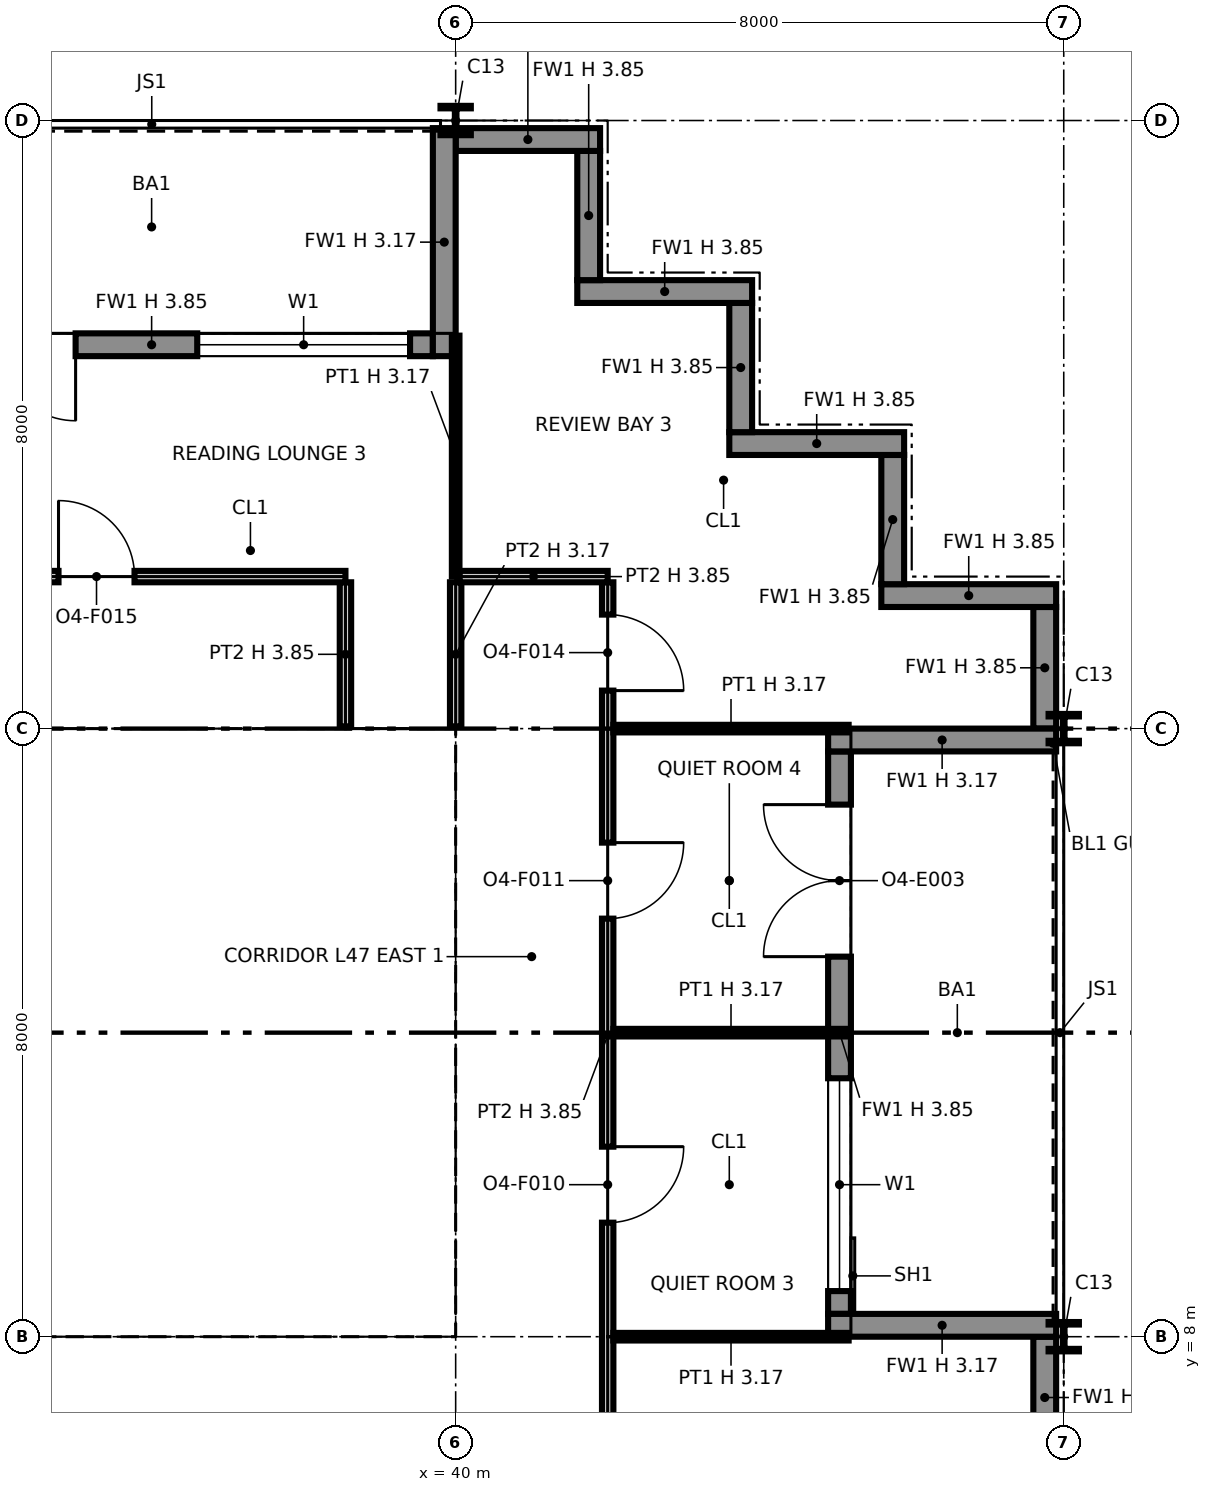
"""IFC4 building model, lengths in metres.
Left out: names, types, materials, properties, quantities, classifications, styles, units other than length and angle.
Written with IfcOpenShell. Run it as: python <this file> out.ifc"""

import sys

from ifc_helpers import new_model, si_unit, direction, frame, frame_2d, origin, origin_2d, place, context, subcontext, project, spatial, polyline, rectangle, i_section, outline, extrude, element, fill, save


model = new_model("IFC4")
c1 = context("Model", 3, precision=1e-05, world=origin(), true_north=direction((0.0, 1.0)))
c2 = subcontext(c1, "Body", "Model", "MODEL_VIEW")
j1 = project(units=[si_unit("LENGTHUNIT", "METRE"), si_unit("PLANEANGLEUNIT", "RADIAN")], contexts=[c1])
p1 = place(None, origin())
s1 = spatial("IfcSite", under=j1, at=p1, CompositionType="ELEMENT")
p2 = place(p1, origin())
s2 = spatial("IfcBuilding", under=s1, at=p2, CompositionType="ELEMENT")
p3 = place(p2, frame((0.0, 0.0, 221.0)))
s3 = spatial("IfcBuildingStorey", under=s2, at=p3, CompositionType="ELEMENT", Elevation=221.0)
for number, where, z_axis, x_axis in (
    (1, (40.0, 8.0, 0.0), (0.0, 0.0, 1.0), (1.0, 0.0, 0.0)),
    (2, (40.0, 16.0, 0.0), (0.0, 0.0, 1.0), (1.0, 0.0, 0.0)),
):
    element("IfcColumn", number, at=place(p3, frame(where, z_axis=z_axis, x_axis=x_axis)), inside=s3, PredefinedType="COLUMN", context=c2, shape_type="SweptSolid", body=[
        extrude(i_section(OverallWidth=0.373, OverallDepth=0.368, WebThickness=0.015, FlangeThickness=0.024, at=origin_2d()), origin(), (0.0, 0.0, 1.0), 3.85),
    ])
for number, where, z_axis, x_axis in (
    (3, (40.0, 24.0, 0.0), (0.0, 0.0, 1.0), (1.0, 0.0, 0.0)),
    (4, (48.0, 8.0, 0.0), (0.0, 0.0, 1.0), (1.0, 0.0, 0.0)),
    (5, (48.0, 16.0, 0.0), (0.0, 0.0, 1.0), (1.0, 0.0, 0.0)),
):
    element("IfcColumn", number, at=place(p3, frame(where, z_axis=z_axis, x_axis=x_axis)), inside=s3, PredefinedType="COLUMN", context=c2, shape_type="SweptSolid", body=[
        extrude(i_section(OverallWidth=0.399, OverallDepth=0.386, WebThickness=0.021, FlangeThickness=0.033, at=origin_2d()), origin(), (0.0, 0.0, 1.0), 3.85),
    ])
p4 = place(p3, frame((47.75, 6.4, 0.0), z_axis=(0.0, 0.0, 1.0), x_axis=(0.0, 1.0, 0.0)))
e6 = element("IfcWall", 6, at=p4, inside=s3, PredefinedType="SOLIDWALL", context=c2, shape_type="SweptSolid", body=[
    extrude(rectangle(XDim=1.6, YDim=0.3, at=frame_2d((0.8, 0.0))), origin(), (0.0, 0.0, 1.0), 3.85),
])
p5 = place(p3, frame((45.05, 8.3, 0.0), z_axis=(0.0, 0.0, 1.0), x_axis=(0.0, 1.0, 0.0)))
e7 = element("IfcWall", 7, at=p5, inside=s3, PredefinedType="SOLIDWALL", context=c2, shape_type="SweptSolid", body=[
    extrude(rectangle(XDim=7.4, YDim=0.3, at=frame_2d((3.7, 0.0))), origin(), (0.0, 0.0, 1.0), 3.85),
])
p6 = place(p5, frame((0.3, 0.0, 0.9)))
e8 = element("IfcOpeningElement", 8, at=p6, cuts=e7, PredefinedType="OPENING", context=c2, shape_type="SweptSolid", body=[
    extrude(rectangle(XDim=2.8, YDim=2.2, at=frame_2d((1.4, 1.1))), frame((0.0, 0.16, 0.0), z_axis=(0.0, -1.0, 0.0), x_axis=(1.0, 0.0, 0.0)), (0.0, 0.0, 1.0), 0.32),
])
p7 = place(p5, frame((4.7, 0.0, 0.0)))
e9 = element("IfcOpeningElement", 9, at=p7, cuts=e7, PredefinedType="OPENING", context=c2, shape_type="SweptSolid", body=[
    extrude(rectangle(XDim=2.0, YDim=2.4, at=frame_2d((1.0, 1.2))), frame((0.0, 0.16, 0.0), z_axis=(0.0, -1.0, 0.0), x_axis=(1.0, 0.0, 0.0)), (0.0, 0.0, 1.0), 0.32),
])
for number, where, z_axis, x_axis in (
    (10, (47.9, 8.15, 0.0), (0.0, 0.0, 1.0), (-1.0, 0.0, 0.0)),
    (11, (47.9, 15.85, 0.0), (0.0, 0.0, 1.0), (-1.0, 0.0, 0.0)),
):
    element("IfcWall", number, at=place(p3, frame(where, z_axis=z_axis, x_axis=x_axis)), inside=s3, PredefinedType="SOLIDWALL", context=c2, shape_type="SweptSolid", body=[
        extrude(rectangle(XDim=3.0, YDim=0.3, at=frame_2d((1.5, 0.0))), origin(), (0.0, 0.0, 1.0), 3.171),
    ])
p8 = place(p3, frame((47.75, 16.0, 0.0), z_axis=(0.0, 0.0, 1.0), x_axis=(0.0, 1.0, 0.0)))
e12 = element("IfcWall", 12, at=p8, inside=s3, PredefinedType="SOLIDWALL", context=c2, shape_type="SweptSolid", body=[
    extrude(rectangle(XDim=1.6, YDim=0.3, at=frame_2d((0.8, 0.0))), origin(), (0.0, 0.0, 1.0), 3.85),
])
p9 = place(p3, frame((47.9, 17.75, 0.0), z_axis=(0.0, 0.0, 1.0), x_axis=(-1.0, 0.0, 0.0)))
e13 = element("IfcWall", 13, at=p9, inside=s3, PredefinedType="SOLIDWALL", context=c2, shape_type="SweptSolid", body=[
    extrude(rectangle(XDim=2.3, YDim=0.3, at=frame_2d((1.15, 0.0))), origin(), (0.0, 0.0, 1.0), 3.85),
])
p10 = place(p3, frame((45.75, 17.9, 0.0), z_axis=(0.0, 0.0, 1.0), x_axis=(0.0, 1.0, 0.0)))
e14 = element("IfcWall", 14, at=p10, inside=s3, PredefinedType="SOLIDWALL", context=c2, shape_type="SweptSolid", body=[
    extrude(rectangle(XDim=1.7, YDim=0.3, at=frame_2d((0.85, 0.0))), origin(), (0.0, 0.0, 1.0), 3.85),
])
p11 = place(p3, frame((45.9, 19.75, 0.0), z_axis=(0.0, 0.0, 1.0), x_axis=(-1.0, 0.0, 0.0)))
e15 = element("IfcWall", 15, at=p11, inside=s3, PredefinedType="SOLIDWALL", context=c2, shape_type="SweptSolid", body=[
    extrude(rectangle(XDim=2.3, YDim=0.3, at=frame_2d((1.15, 0.0))), origin(), (0.0, 0.0, 1.0), 3.85),
])
p12 = place(p3, frame((43.75, 19.9, 0.0), z_axis=(0.0, 0.0, 1.0), x_axis=(0.0, 1.0, 0.0)))
e16 = element("IfcWall", 16, at=p12, inside=s3, PredefinedType="SOLIDWALL", context=c2, shape_type="SweptSolid", body=[
    extrude(rectangle(XDim=1.7, YDim=0.3, at=frame_2d((0.85, 0.0))), origin(), (0.0, 0.0, 1.0), 3.85),
])
p13 = place(p3, frame((43.9, 21.75, 0.0), z_axis=(0.0, 0.0, 1.0), x_axis=(-1.0, 0.0, 0.0)))
e17 = element("IfcWall", 17, at=p13, inside=s3, PredefinedType="SOLIDWALL", context=c2, shape_type="SweptSolid", body=[
    extrude(rectangle(XDim=2.3, YDim=0.3, at=frame_2d((1.15, 0.0))), origin(), (0.0, 0.0, 1.0), 3.85),
])
p14 = place(p3, frame((41.75, 21.9, 0.0), z_axis=(0.0, 0.0, 1.0), x_axis=(0.0, 1.0, 0.0)))
e18 = element("IfcWall", 18, at=p14, inside=s3, PredefinedType="SOLIDWALL", context=c2, shape_type="SweptSolid", body=[
    extrude(rectangle(XDim=1.7, YDim=0.3, at=frame_2d((0.85, 0.0))), origin(), (0.0, 0.0, 1.0), 3.85),
])
p15 = place(p3, frame((41.9, 23.75, 0.0), z_axis=(0.0, 0.0, 1.0), x_axis=(-1.0, 0.0, 0.0)))
e19 = element("IfcWall", 19, at=p15, inside=s3, PredefinedType="SOLIDWALL", context=c2, shape_type="SweptSolid", body=[
    extrude(rectangle(XDim=1.9, YDim=0.3, at=frame_2d((0.95, 0.0))), origin(), (0.0, 0.0, 1.0), 3.85),
])
p16 = place(p3, frame((39.7, 21.05, 0.0), z_axis=(0.0, 0.0, 1.0), x_axis=(-1.0, 0.0, 0.0)))
e20 = element("IfcWall", 20, at=p16, inside=s3, PredefinedType="SOLIDWALL", context=c2, shape_type="SweptSolid", body=[
    extrude(rectangle(XDim=7.4, YDim=0.3, at=frame_2d((3.7, 0.0))), origin(), (0.0, 0.0, 1.0), 3.85),
])
p17 = place(p16, frame((0.3, 0.0, 0.9)))
e21 = element("IfcOpeningElement", 21, at=p17, cuts=e20, PredefinedType="OPENING", context=c2, shape_type="SweptSolid", body=[
    extrude(rectangle(XDim=2.8, YDim=2.2, at=frame_2d((1.4, 1.1))), frame((0.0, 0.16, 0.0), z_axis=(0.0, -1.0, 0.0), x_axis=(1.0, 0.0, 0.0)), (0.0, 0.0, 1.0), 0.32),
])
p18 = place(p16, frame((4.7, 0.0, 0.0)))
e22 = element("IfcOpeningElement", 22, at=p18, cuts=e20, PredefinedType="OPENING", context=c2, shape_type="SweptSolid", body=[
    extrude(rectangle(XDim=2.0, YDim=2.4, at=frame_2d((1.0, 1.2))), frame((0.0, 0.16, 0.0), z_axis=(0.0, -1.0, 0.0), x_axis=(1.0, 0.0, 0.0)), (0.0, 0.0, 1.0), 0.32),
])
p19 = place(p3, frame((39.85, 23.9, 0.0), z_axis=(0.0, 0.0, 1.0), x_axis=(0.0, -1.0, 0.0)))
e23 = element("IfcWall", 23, at=p19, inside=s3, PredefinedType="SOLIDWALL", context=c2, shape_type="SweptSolid", body=[
    extrude(rectangle(XDim=3.0, YDim=0.3, at=frame_2d((1.5, 0.0))), origin(), (0.0, 0.0, 1.0), 3.171),
])
p20 = place(p3, frame((24.65, 8.75, 0.0), z_axis=(0.0, 0.0, 1.0), x_axis=(1.0, 0.0, 0.0)))
e24 = element("IfcWall", 24, at=p20, inside=s3, PredefinedType="PARTITIONING", context=c2, shape_type="SweptSolid", body=[
    extrude(outline(polyline([(0.0, 0.0), (14.7, 0.0), (14.7, 3.85), (7.438, 3.85), (7.438, 3.308), (7.262, 3.308), (7.261, 3.85), (0.0, 3.85), (0.0, 0.0)])), frame((0.0, 0.1, 0.0), z_axis=(0.0, -1.0, 0.0), x_axis=(1.0, 0.0, 0.0)), (0.0, 0.0, 1.0), 0.2),
])
p21 = place(p3, frame((24.65, 15.25, 0.0), z_axis=(0.0, 0.0, 1.0), x_axis=(1.0, 0.0, 0.0)))
e25 = element("IfcWall", 25, at=p21, inside=s3, PredefinedType="PARTITIONING", context=c2, shape_type="SweptSolid", body=[
    extrude(outline(polyline([(0.0, 0.0), (14.7, 0.0), (14.7, 3.85), (7.438, 3.85), (7.438, 3.308), (7.262, 3.308), (7.261, 3.85), (0.0, 3.85), (0.0, 0.0)])), frame((0.0, 0.1, 0.0), z_axis=(0.0, -1.0, 0.0), x_axis=(1.0, 0.0, 0.0)), (0.0, 0.0, 1.0), 0.2),
])
p22 = place(p21, frame((2.85, 0.0, 0.0)))
e26 = element("IfcOpeningElement", 26, at=p22, cuts=e25, PredefinedType="OPENING", context=c2, shape_type="SweptSolid", body=[
    extrude(rectangle(XDim=1.8, YDim=2.1, at=frame_2d((0.9, 1.05))), frame((0.0, 0.11, 0.0), z_axis=(0.0, -1.0, 0.0), x_axis=(1.0, 0.0, 0.0)), (0.0, 0.0, 1.0), 0.22),
])
p23 = place(p21, frame((9.95, 0.0, 0.0), z_axis=(0.0, 0.0, 1.0), x_axis=(-1.0, 0.0, 0.0)))
e27 = element("IfcOpeningElement", 27, at=p23, cuts=e25, PredefinedType="OPENING", context=c2, shape_type="SweptSolid", body=[
    extrude(rectangle(XDim=1.4, YDim=2.1, at=frame_2d((0.7, 1.05))), frame((0.0, 0.11, 0.0), z_axis=(0.0, -1.0, 0.0), x_axis=(1.0, 0.0, 0.0)), (0.0, 0.0, 1.0), 0.22),
])
p24 = place(p21, frame((13.4, 0.0, 0.0), z_axis=(0.0, 0.0, 1.0), x_axis=(-1.0, 0.0, 0.0)))
e28 = element("IfcOpeningElement", 28, at=p24, cuts=e25, PredefinedType="OPENING", context=c2, shape_type="SweptSolid", body=[
    extrude(rectangle(XDim=1.4, YDim=2.1, at=frame_2d((0.7, 1.05))), frame((0.0, 0.11, 0.0), z_axis=(0.0, -1.0, 0.0), x_axis=(1.0, 0.0, 0.0)), (0.0, 0.0, 1.0), 0.22),
])
for number, where, z_axis, x_axis in (
    (29, (35.6, 8.85, 0.0), (0.0, 0.0, 1.0), (0.0, 1.0, 0.0)),
    (30, (39.25, 8.85, 0.0), (0.0, 0.0, 1.0), (0.0, 1.0, 0.0)),
):
    element("IfcWall", number, at=place(p3, frame(where, z_axis=z_axis, x_axis=x_axis)), inside=s3, PredefinedType="PARTITIONING", context=c2, shape_type="SweptSolid", body=[
        extrude(rectangle(XDim=6.3, YDim=0.2, at=frame_2d((3.15, 0.0))), origin(), (0.0, 0.0, 1.0), 3.85),
    ])
p25 = place(p3, frame((42.0, 6.0, 0.0), z_axis=(0.0, 0.0, 1.0), x_axis=(0.0, 1.0, 0.0)))
e31 = element("IfcWall", 31, at=p25, inside=s3, PredefinedType="PARTITIONING", context=c2, shape_type="SweptSolid", body=[
    extrude(outline(polyline([(0.0, 0.0), (11.925, 0.0), (11.925, 3.85), (10.3, 3.85), (10.298, 3.172), (9.702, 3.172), (9.7, 3.85), (6.3, 3.85), (6.298, 3.172), (5.702, 3.172), (5.7, 3.85), (2.3, 3.85), (2.298, 3.172), (1.702, 3.172), (1.7, 3.85), (0.0, 3.85), (0.0, 0.0)])), frame((0.0, 0.075, 0.0), z_axis=(0.0, -1.0, 0.0), x_axis=(1.0, 0.0, 0.0)), (0.0, 0.0, 1.0), 0.15),
])
p26 = place(p25, frame((4.5, 0.0, 0.0), z_axis=(0.0, 0.0, 1.0), x_axis=(-1.0, 0.0, 0.0)))
e32 = element("IfcOpeningElement", 32, at=p26, cuts=e31, PredefinedType="OPENING", context=c2, shape_type="SweptSolid", body=[
    extrude(rectangle(XDim=1.0, YDim=2.1, at=frame_2d((0.5, 1.05))), frame((0.0, 0.085, 0.0), z_axis=(0.0, -1.0, 0.0), x_axis=(1.0, 0.0, 0.0)), (0.0, 0.0, 1.0), 0.17),
])
p27 = place(p25, frame((8.5, 0.0, 0.0), z_axis=(0.0, 0.0, 1.0), x_axis=(-1.0, 0.0, 0.0)))
e33 = element("IfcOpeningElement", 33, at=p27, cuts=e31, PredefinedType="OPENING", context=c2, shape_type="SweptSolid", body=[
    extrude(rectangle(XDim=1.0, YDim=2.1, at=frame_2d((0.5, 1.05))), frame((0.0, 0.085, 0.0), z_axis=(0.0, -1.0, 0.0), x_axis=(1.0, 0.0, 0.0)), (0.0, 0.0, 1.0), 0.17),
])
p28 = place(p25, frame((11.5, 0.0, 0.0), z_axis=(0.0, 0.0, 1.0), x_axis=(-1.0, 0.0, 0.0)))
e34 = element("IfcOpeningElement", 34, at=p28, cuts=e31, PredefinedType="OPENING", context=c2, shape_type="SweptSolid", body=[
    extrude(rectangle(XDim=1.0, YDim=2.1, at=frame_2d((0.5, 1.05))), frame((0.0, 0.085, 0.0), z_axis=(0.0, -1.0, 0.0), x_axis=(1.0, 0.0, 0.0)), (0.0, 0.0, 1.0), 0.17),
])
for number, where, z_axis, x_axis in (
    (35, (42.075, 8.0, 0.0), (0.0, 0.0, 1.0), (1.0, 0.0, 0.0)),
    (36, (42.075, 12.0, 0.0), (0.0, 0.0, 1.0), (1.0, 0.0, 0.0)),
    (37, (42.075, 16.0, 0.0), (0.0, 0.0, 1.0), (1.0, 0.0, 0.0)),
):
    element("IfcWall", number, at=place(p3, frame(where, z_axis=z_axis, x_axis=x_axis)), inside=s3, PredefinedType="PARTITIONING", context=c2, shape_type="SweptSolid", body=[
        extrude(rectangle(XDim=3.095, YDim=0.1, at=frame_2d((1.547, 0.0))), origin(), (0.0, 0.0, 1.0), 3.172),
    ])
p29 = place(p3, frame((38.55, 16.03, 0.0), z_axis=(0.0, 0.0, 1.0), x_axis=(0.0, 1.0, 0.0)))
e38 = element("IfcWall", 38, at=p29, inside=s3, PredefinedType="PARTITIONING", context=c2, shape_type="SweptSolid", body=[
    extrude(rectangle(XDim=1.895, YDim=0.15, at=frame_2d((0.948, 0.0))), origin(), (0.0, 0.0, 1.0), 3.85),
])
p30 = place(p3, frame((40.0, 16.03, 0.0), z_axis=(0.0, 0.0, 1.0), x_axis=(0.0, 1.0, 0.0)))
e39 = element("IfcWall", 39, at=p30, inside=s3, PredefinedType="PARTITIONING", context=c2, shape_type="SweptSolid", body=[
    extrude(rectangle(XDim=1.895, YDim=0.15, at=frame_2d((0.948, 0.0))), origin(), (0.0, 0.0, 1.0), 3.172),
])
p31 = place(p3, frame((26.075, 18.0, 0.0), z_axis=(0.0, 0.0, 1.0), x_axis=(1.0, 0.0, 0.0)))
e40 = element("IfcWall", 40, at=p31, inside=s3, PredefinedType="PARTITIONING", context=c2, shape_type="SweptSolid", body=[
    extrude(rectangle(XDim=12.475, YDim=0.15, at=frame_2d((6.238, 0.0))), origin(), (0.0, 0.0, 1.0), 3.85),
])
p32 = place(p31, frame((8.7, 0.0, 0.0)))
e41 = element("IfcOpeningElement", 41, at=p32, cuts=e40, PredefinedType="OPENING", context=c2, shape_type="SweptSolid", body=[
    extrude(rectangle(XDim=1.0, YDim=2.1, at=frame_2d((0.5, 1.05))), frame((0.0, 0.085, 0.0), z_axis=(0.0, -1.0, 0.0), x_axis=(1.0, 0.0, 0.0)), (0.0, 0.0, 1.0), 0.17),
])
p33 = place(p31, frame((3.425, 0.0, 0.0)))
e42 = element("IfcOpeningElement", 42, at=p33, cuts=e40, PredefinedType="OPENING", context=c2, shape_type="SweptSolid", body=[
    extrude(rectangle(XDim=1.0, YDim=2.1, at=frame_2d((0.5, 1.05))), frame((0.0, 0.085, 0.0), z_axis=(0.0, -1.0, 0.0), x_axis=(1.0, 0.0, 0.0)), (0.0, 0.0, 1.0), 0.17),
])
p34 = place(p3, frame((40.05, 18.0, 0.0), z_axis=(0.0, 0.0, 1.0), x_axis=(1.0, 0.0, 0.0)))
e43 = element("IfcWall", 43, at=p34, inside=s3, PredefinedType="PARTITIONING", context=c2, shape_type="SweptSolid", body=[
    extrude(rectangle(XDim=1.95, YDim=0.15, at=frame_2d((0.975, 0.0))), origin(), (0.0, 0.0, 1.0), 3.85),
])
p35 = place(p3, frame((40.0, 18.0, 0.0), z_axis=(0.0, 0.0, 1.0), x_axis=(0.0, 1.0, 0.0)))
e44 = element("IfcWall", 44, at=p35, inside=s3, PredefinedType="PARTITIONING", context=c2, shape_type="SweptSolid", body=[
    extrude(rectangle(XDim=3.17, YDim=0.1, at=frame_2d((1.585, 0.0))), origin(), (0.0, 0.0, 1.0), 3.172),
])
p36 = place(p6, origin())
e45 = element("IfcWindow", 45, at=p36, inside=s3, PartitioningType="SINGLE_PANEL", PredefinedType="WINDOW", context=c2, shape_type="SweptSolid", body=[
    extrude(rectangle(XDim=2.8, YDim=2.2, at=frame_2d((1.4, 1.1))), frame((0.0, 0.03, 0.0), z_axis=(0.0, -1.0, 0.0), x_axis=(1.0, 0.0, 0.0)), (0.0, 0.0, 1.0), 0.06),
])
fill(e8, e45)
p37 = place(p7, origin())
e46 = element("IfcDoor", 46, at=p37, inside=s3, OperationType="DOUBLE_DOOR_SINGLE_SWING", PredefinedType="DOOR", context=c2, shape_type="SweptSolid", body=[
    extrude(rectangle(XDim=2.0, YDim=2.4, at=frame_2d((1.0, 1.2))), frame((0.0, 0.025, 0.0), z_axis=(0.0, -1.0, 0.0), x_axis=(1.0, 0.0, 0.0)), (0.0, 0.0, 1.0), 0.05),
])
fill(e9, e46)
p38 = place(p17, origin())
e47 = element("IfcWindow", 47, at=p38, inside=s3, PartitioningType="SINGLE_PANEL", PredefinedType="WINDOW", context=c2, shape_type="SweptSolid", body=[
    extrude(rectangle(XDim=2.8, YDim=2.2, at=frame_2d((1.4, 1.1))), frame((0.0, 0.03, 0.0), z_axis=(0.0, -1.0, 0.0), x_axis=(1.0, 0.0, 0.0)), (0.0, 0.0, 1.0), 0.06),
])
fill(e21, e47)
p39 = place(p18, origin())
e48 = element("IfcDoor", 48, at=p39, inside=s3, OperationType="DOUBLE_DOOR_SINGLE_SWING", PredefinedType="DOOR", context=c2, shape_type="SweptSolid", body=[
    extrude(rectangle(XDim=2.0, YDim=2.4, at=frame_2d((1.0, 1.2))), frame((0.0, 0.025, 0.0), z_axis=(0.0, -1.0, 0.0), x_axis=(1.0, 0.0, 0.0)), (0.0, 0.0, 1.0), 0.05),
])
fill(e22, e48)
p40 = place(p24, origin())
e49 = element("IfcDoor", 49, at=p40, inside=s3, OperationType="DOUBLE_DOOR_SINGLE_SWING", PredefinedType="NOTDEFINED", context=c2, shape_type="SweptSolid", body=[
    extrude(rectangle(XDim=1.4, YDim=2.1, at=frame_2d((0.7, 1.05))), frame((0.0, 0.025, 0.0), z_axis=(0.0, -1.0, 0.0), x_axis=(1.0, 0.0, 0.0)), (0.0, 0.0, 1.0), 0.05),
])
fill(e28, e49)
p41 = place(p26, origin())
e50 = element("IfcDoor", 50, at=p41, inside=s3, OperationType="SINGLE_SWING_LEFT", PredefinedType="DOOR", context=c2, shape_type="SweptSolid", body=[
    extrude(rectangle(XDim=1.0, YDim=2.1, at=frame_2d((0.5, 1.05))), frame((0.0, 0.025, 0.0), z_axis=(0.0, -1.0, 0.0), x_axis=(1.0, 0.0, 0.0)), (0.0, 0.0, 1.0), 0.05),
])
fill(e32, e50)
p42 = place(p27, origin())
e51 = element("IfcDoor", 51, at=p42, inside=s3, OperationType="SINGLE_SWING_LEFT", PredefinedType="DOOR", context=c2, shape_type="SweptSolid", body=[
    extrude(rectangle(XDim=1.0, YDim=2.1, at=frame_2d((0.5, 1.05))), frame((0.0, 0.025, 0.0), z_axis=(0.0, -1.0, 0.0), x_axis=(1.0, 0.0, 0.0)), (0.0, 0.0, 1.0), 0.05),
])
fill(e33, e51)
p43 = place(p28, origin())
e52 = element("IfcDoor", 52, at=p43, inside=s3, OperationType="SINGLE_SWING_RIGHT", PredefinedType="DOOR", context=c2, shape_type="SweptSolid", body=[
    extrude(rectangle(XDim=1.0, YDim=2.1, at=frame_2d((0.5, 1.05))), frame((0.0, 0.025, 0.0), z_axis=(0.0, -1.0, 0.0), x_axis=(1.0, 0.0, 0.0)), (0.0, 0.0, 1.0), 0.05),
])
fill(e34, e52)
p44 = place(p32, origin())
e53 = element("IfcDoor", 53, at=p44, inside=s3, OperationType="SINGLE_SWING_LEFT", PredefinedType="DOOR", context=c2, shape_type="SweptSolid", body=[
    extrude(rectangle(XDim=1.0, YDim=2.1, at=frame_2d((0.5, 1.05))), frame((0.0, 0.025, 0.0), z_axis=(0.0, -1.0, 0.0), x_axis=(1.0, 0.0, 0.0)), (0.0, 0.0, 1.0), 0.05),
])
fill(e41, e53)
save(model, sys.argv[1])
